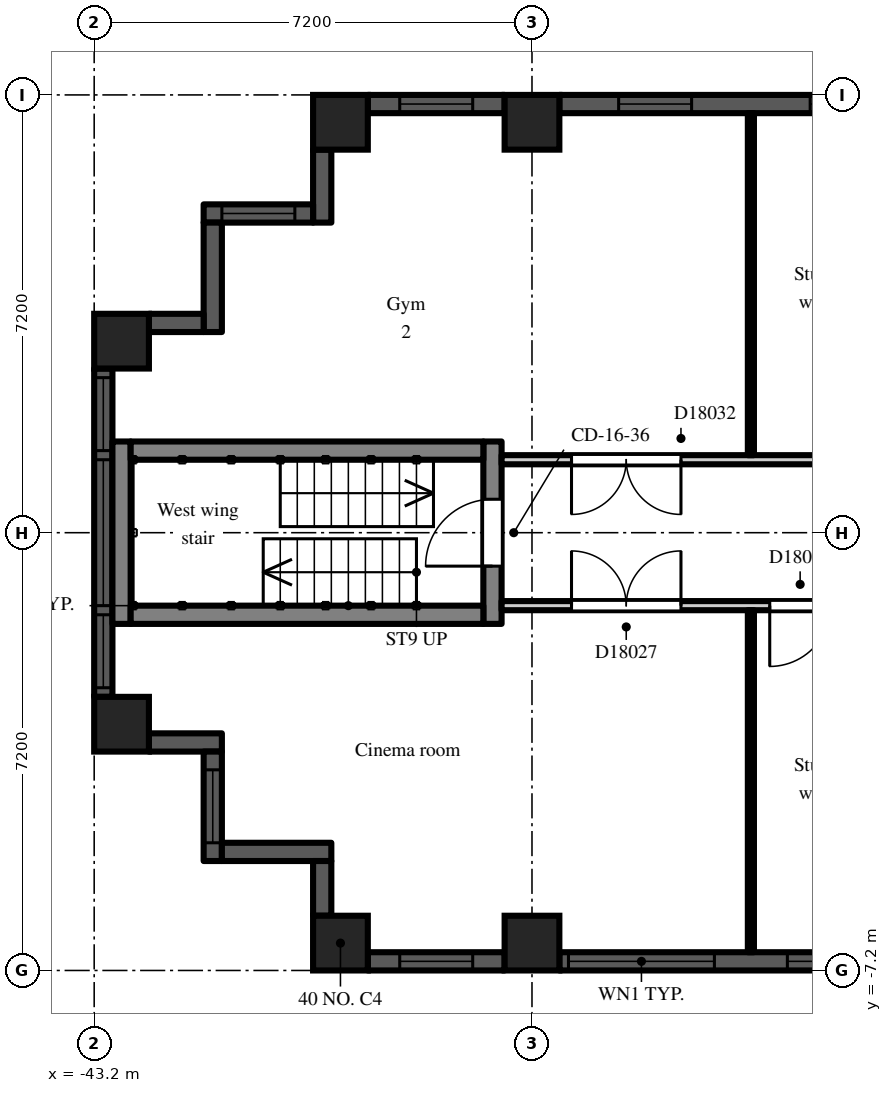
"""IFC4 building model, lengths in metres.
Left out: names, types, materials, properties, quantities, classifications, styles, units other than length and angle.
Written with IfcOpenShell. Run it as: python <this file> out.ifc"""

import sys

from ifc_helpers import new_model, si_unit, direction, frame, frame_2d, origin, origin_2d, place, context, subcontext, project, spatial, rectangle, extrude, element, fill, save


model = new_model("IFC4")
c1 = context("Model", 3, precision=1e-05, world=origin(), true_north=direction((0.0, 1.0)))
c2 = subcontext(c1, "Body", "Model", "MODEL_VIEW")
j1 = project(units=[si_unit("LENGTHUNIT", "METRE"), si_unit("PLANEANGLEUNIT", "RADIAN")], contexts=[c1])
p1 = place(None, origin())
s1 = spatial("IfcSite", under=j1, at=p1, CompositionType="ELEMENT")
p2 = place(p1, origin())
s2 = spatial("IfcBuilding", under=s1, at=p2, CompositionType="ELEMENT")
p3 = place(p2, frame((0.0, 0.0, 123.3)))
s3 = spatial("IfcBuildingStorey", under=s2, at=p3, CompositionType="ELEMENT", Elevation=123.3)
for number, where, z_axis, x_axis in (
    (1, (-42.75, -3.15, 0.0), (0.0, 0.0, 1.0), (1.0, 0.0, 0.0)),
    (2, (-42.75, 3.15, 0.0), (0.0, 0.0, 1.0), (1.0, 0.0, 0.0)),
    (3, (-39.15, -6.75, 0.0), (0.0, 0.0, 1.0), (1.0, 0.0, 0.0)),
    (4, (-39.15, 6.75, 0.0), (0.0, 0.0, 1.0), (1.0, 0.0, 0.0)),
    (5, (-36.0, -6.75, 0.0), (0.0, 0.0, 1.0), (1.0, 0.0, 0.0)),
    (6, (-36.0, 6.75, 0.0), (0.0, 0.0, 1.0), (1.0, 0.0, 0.0)),
):
    element("IfcColumn", number, at=place(p3, frame(where, z_axis=z_axis, x_axis=x_axis)), inside=s3, PredefinedType="COLUMN", context=c2, shape_type="SweptSolid", body=[
        extrude(rectangle(XDim=0.9, YDim=0.9, at=origin_2d()), origin(), (0.0, 0.0, 1.0), 3.0),
    ])
p4 = place(p3, frame((-29.25, 7.05, 0.0), z_axis=(0.0, 0.0, 1.0), x_axis=(-1.0, 0.0, 0.0)))
e7 = element("IfcWall", 7, at=p4, inside=s3, PredefinedType="SOLIDWALL", context=c2, shape_type="SweptSolid", body=[
    extrude(rectangle(XDim=6.3, YDim=0.3, at=frame_2d((3.15, 0.0))), origin(), (0.0, 0.0, 1.0), 2.2),
])
p5 = place(p4, frame((0.975, 0.0, 0.2)))
e8 = element("IfcOpeningElement", 8, at=p5, cuts=e7, PredefinedType="OPENING", context=c2, shape_type="SweptSolid", body=[
    extrude(rectangle(XDim=1.2, YDim=1.85, at=frame_2d((0.6, 0.925))), frame((0.0, 0.16, 0.0), z_axis=(0.0, -1.0, 0.0), x_axis=(1.0, 0.0, 0.0)), (0.0, 0.0, 1.0), 0.32),
])
p6 = place(p4, frame((4.125, 0.0, 0.2)))
e9 = element("IfcOpeningElement", 9, at=p6, cuts=e7, PredefinedType="OPENING", context=c2, shape_type="SweptSolid", body=[
    extrude(rectangle(XDim=1.2, YDim=1.85, at=frame_2d((0.6, 0.925))), frame((0.0, 0.16, 0.0), z_axis=(0.0, -1.0, 0.0), x_axis=(1.0, 0.0, 0.0)), (0.0, 0.0, 1.0), 0.32),
])
p7 = place(p3, frame((-36.45, 7.05, 0.0), z_axis=(0.0, 0.0, 1.0), x_axis=(-1.0, 0.0, 0.0)))
e10 = element("IfcWall", 10, at=p7, inside=s3, PredefinedType="SOLIDWALL", context=c2, shape_type="SweptSolid", body=[
    extrude(rectangle(XDim=2.25, YDim=0.3, at=frame_2d((1.125, 0.0))), origin(), (0.0, 0.0, 1.0), 2.2),
])
p8 = place(p7, frame((0.525, 0.0, 0.2)))
e11 = element("IfcOpeningElement", 11, at=p8, cuts=e10, PredefinedType="OPENING", context=c2, shape_type="SweptSolid", body=[
    extrude(rectangle(XDim=1.2, YDim=1.85, at=frame_2d((0.6, 0.925))), frame((0.0, 0.16, 0.0), z_axis=(0.0, -1.0, 0.0), x_axis=(1.0, 0.0, 0.0)), (0.0, 0.0, 1.0), 0.32),
])
p9 = place(p3, frame((-39.45, 6.3, 0.0), z_axis=(0.0, 0.0, 1.0), x_axis=(0.0, -1.0, 0.0)))
e12 = element("IfcWall", 12, at=p9, inside=s3, PredefinedType="SOLIDWALL", context=c2, shape_type="SweptSolid", body=[
    extrude(rectangle(XDim=1.2, YDim=0.3, at=frame_2d((0.6, 0.0))), origin(), (0.0, 0.0, 1.0), 2.6),
])
p10 = place(p3, frame((-39.6, 5.25, 0.0), z_axis=(0.0, 0.0, 1.0), x_axis=(-1.0, 0.0, 0.0)))
e13 = element("IfcWall", 13, at=p10, inside=s3, PredefinedType="SOLIDWALL", context=c2, shape_type="SweptSolid", body=[
    extrude(rectangle(XDim=1.8, YDim=0.3, at=frame_2d((0.9, 0.0))), origin(), (0.0, 0.0, 1.0), 2.6),
])
p11 = place(p10, frame((0.3, 0.0, 0.2)))
e14 = element("IfcOpeningElement", 14, at=p11, cuts=e13, PredefinedType="OPENING", context=c2, shape_type="SweptSolid", body=[
    extrude(rectangle(XDim=1.2, YDim=1.85, at=frame_2d((0.6, 0.925))), frame((0.0, 0.16, 0.0), z_axis=(0.0, -1.0, 0.0), x_axis=(1.0, 0.0, 0.0)), (0.0, 0.0, 1.0), 0.32),
])
p12 = place(p3, frame((-41.25, 5.1, 0.0), z_axis=(0.0, 0.0, 1.0), x_axis=(0.0, -1.0, 0.0)))
e15 = element("IfcWall", 15, at=p12, inside=s3, PredefinedType="SOLIDWALL", context=c2, shape_type="SweptSolid", body=[
    extrude(rectangle(XDim=1.8, YDim=0.3, at=frame_2d((0.9, 0.0))), origin(), (0.0, 0.0, 1.0), 2.6),
])
p13 = place(p3, frame((-41.4, 3.45, 0.0), z_axis=(0.0, 0.0, 1.0), x_axis=(-1.0, 0.0, 0.0)))
e16 = element("IfcWall", 16, at=p13, inside=s3, PredefinedType="SOLIDWALL", context=c2, shape_type="SweptSolid", body=[
    extrude(rectangle(XDim=0.9, YDim=0.3, at=frame_2d((0.45, 0.0))), origin(), (0.0, 0.0, 1.0), 2.6),
])
p14 = place(p3, frame((-43.05, 2.7, 0.0), z_axis=(0.0, 0.0, 1.0), x_axis=(0.0, -1.0, 0.0)))
e17 = element("IfcWall", 17, at=p14, inside=s3, PredefinedType="SOLIDWALL", context=c2, shape_type="SweptSolid", body=[
    extrude(rectangle(XDim=5.4, YDim=0.3, at=frame_2d((2.7, 0.0))), origin(), (0.0, 0.0, 1.0), 2.2),
])
p15 = place(p14, frame((1.5, 0.0, 0.2)))
e18 = element("IfcOpeningElement", 18, at=p15, cuts=e17, PredefinedType="OPENING", context=c2, shape_type="SweptSolid", body=[
    extrude(rectangle(XDim=2.4, YDim=1.85, at=frame_2d((1.2, 0.925))), frame((0.0, 0.16, 0.0), z_axis=(0.0, -1.0, 0.0), x_axis=(1.0, 0.0, 0.0)), (0.0, 0.0, 1.0), 0.32),
])
p16 = place(p14, frame((0.15, 0.0, 0.2)))
e19 = element("IfcOpeningElement", 19, at=p16, cuts=e17, PredefinedType="OPENING", context=c2, shape_type="SweptSolid", body=[
    extrude(rectangle(XDim=1.2, YDim=1.85, at=frame_2d((0.6, 0.925))), frame((0.0, 0.16, 0.0), z_axis=(0.0, -1.0, 0.0), x_axis=(1.0, 0.0, 0.0)), (0.0, 0.0, 1.0), 0.32),
])
p17 = place(p14, frame((4.05, 0.0, 0.2)))
e20 = element("IfcOpeningElement", 20, at=p17, cuts=e17, PredefinedType="OPENING", context=c2, shape_type="SweptSolid", body=[
    extrude(rectangle(XDim=1.2, YDim=1.85, at=frame_2d((0.6, 0.925))), frame((0.0, 0.16, 0.0), z_axis=(0.0, -1.0, 0.0), x_axis=(1.0, 0.0, 0.0)), (0.0, 0.0, 1.0), 0.32),
])
p18 = place(p3, frame((-42.3, -3.45, 0.0), z_axis=(0.0, 0.0, 1.0), x_axis=(1.0, 0.0, 0.0)))
e21 = element("IfcWall", 21, at=p18, inside=s3, PredefinedType="SOLIDWALL", context=c2, shape_type="SweptSolid", body=[
    extrude(rectangle(XDim=1.2, YDim=0.3, at=frame_2d((0.6, 0.0))), origin(), (0.0, 0.0, 1.0), 2.6),
])
p19 = place(p3, frame((-41.25, -3.6, 0.0), z_axis=(0.0, 0.0, 1.0), x_axis=(0.0, -1.0, 0.0)))
e22 = element("IfcWall", 22, at=p19, inside=s3, PredefinedType="SOLIDWALL", context=c2, shape_type="SweptSolid", body=[
    extrude(rectangle(XDim=1.8, YDim=0.3, at=frame_2d((0.9, 0.0))), origin(), (0.0, 0.0, 1.0), 2.6),
])
p20 = place(p19, frame((0.3, 0.0, 0.2)))
e23 = element("IfcOpeningElement", 23, at=p20, cuts=e22, PredefinedType="OPENING", context=c2, shape_type="SweptSolid", body=[
    extrude(rectangle(XDim=1.2, YDim=1.85, at=frame_2d((0.6, 0.925))), frame((0.0, 0.16, 0.0), z_axis=(0.0, -1.0, 0.0), x_axis=(1.0, 0.0, 0.0)), (0.0, 0.0, 1.0), 0.32),
])
p21 = place(p3, frame((-41.1, -5.25, 0.0), z_axis=(0.0, 0.0, 1.0), x_axis=(1.0, 0.0, 0.0)))
e24 = element("IfcWall", 24, at=p21, inside=s3, PredefinedType="SOLIDWALL", context=c2, shape_type="SweptSolid", body=[
    extrude(rectangle(XDim=1.8, YDim=0.3, at=frame_2d((0.9, 0.0))), origin(), (0.0, 0.0, 1.0), 2.6),
])
p22 = place(p3, frame((-39.45, -5.4, 0.0), z_axis=(0.0, 0.0, 1.0), x_axis=(0.0, -1.0, 0.0)))
e25 = element("IfcWall", 25, at=p22, inside=s3, PredefinedType="SOLIDWALL", context=c2, shape_type="SweptSolid", body=[
    extrude(rectangle(XDim=0.9, YDim=0.3, at=frame_2d((0.45, 0.0))), origin(), (0.0, 0.0, 1.0), 2.6),
])
p23 = place(p3, frame((-38.7, -7.05, 0.0), z_axis=(0.0, 0.0, 1.0), x_axis=(1.0, 0.0, 0.0)))
e26 = element("IfcWall", 26, at=p23, inside=s3, PredefinedType="SOLIDWALL", context=c2, shape_type="SweptSolid", body=[
    extrude(rectangle(XDim=2.25, YDim=0.3, at=frame_2d((1.125, 0.0))), origin(), (0.0, 0.0, 1.0), 2.2),
])
p24 = place(p23, frame((0.525, 0.0, 0.2)))
e27 = element("IfcOpeningElement", 27, at=p24, cuts=e26, PredefinedType="OPENING", context=c2, shape_type="SweptSolid", body=[
    extrude(rectangle(XDim=1.2, YDim=1.85, at=frame_2d((0.6, 0.925))), frame((0.0, 0.16, 0.0), z_axis=(0.0, -1.0, 0.0), x_axis=(1.0, 0.0, 0.0)), (0.0, 0.0, 1.0), 0.32),
])
p25 = place(p3, frame((-35.55, -7.05, 0.0), z_axis=(0.0, 0.0, 1.0), x_axis=(1.0, 0.0, 0.0)))
e28 = element("IfcWall", 28, at=p25, inside=s3, PredefinedType="SOLIDWALL", context=c2, shape_type="SweptSolid", body=[
    extrude(rectangle(XDim=6.3, YDim=0.3, at=frame_2d((3.15, 0.0))), origin(), (0.0, 0.0, 1.0), 2.2),
])
p26 = place(p25, frame((0.15, 0.0, 0.2)))
e29 = element("IfcOpeningElement", 29, at=p26, cuts=e28, PredefinedType="OPENING", context=c2, shape_type="SweptSolid", body=[
    extrude(rectangle(XDim=2.4, YDim=1.85, at=frame_2d((1.2, 0.925))), frame((0.0, 0.16, 0.0), z_axis=(0.0, -1.0, 0.0), x_axis=(1.0, 0.0, 0.0)), (0.0, 0.0, 1.0), 0.32),
])
p27 = place(p25, frame((3.75, 0.0, 0.2)))
e30 = element("IfcOpeningElement", 30, at=p27, cuts=e28, PredefinedType="OPENING", context=c2, shape_type="SweptSolid", body=[
    extrude(rectangle(XDim=2.4, YDim=1.85, at=frame_2d((1.2, 0.925))), frame((0.0, 0.16, 0.0), z_axis=(0.0, -1.0, 0.0), x_axis=(1.0, 0.0, 0.0)), (0.0, 0.0, 1.0), 0.32),
])
p28 = place(p3, frame((-36.65, -1.5, 0.0), z_axis=(0.0, 0.0, 1.0), x_axis=(0.0, 1.0, 0.0)))
e31 = element("IfcWall", 31, at=p28, inside=s3, PredefinedType="SHEAR", context=c2, shape_type="SweptSolid", body=[
    extrude(rectangle(XDim=3.0, YDim=0.3, at=frame_2d((1.5, 0.0))), origin(), (0.0, 0.0, 1.0), 2.6),
])
p29 = place(p28, frame((0.95, 0.0, 0.0)))
e32 = element("IfcOpeningElement", 32, at=p29, cuts=e31, PredefinedType="OPENING", context=c2, shape_type="SweptSolid", body=[
    extrude(rectangle(XDim=1.1, YDim=2.1, at=frame_2d((0.55, 1.05))), frame((0.0, 0.16, 0.0), z_axis=(0.0, -1.0, 0.0), x_axis=(1.0, 0.0, 0.0)), (0.0, 0.0, 1.0), 0.32),
])
p30 = place(p3, frame((-42.75, -1.5, 0.0), z_axis=(0.0, 0.0, 1.0), x_axis=(0.0, 1.0, 0.0)))
e33 = element("IfcWall", 33, at=p30, inside=s3, PredefinedType="SHEAR", context=c2, shape_type="SweptSolid", body=[
    extrude(rectangle(XDim=3.0, YDim=0.3, at=frame_2d((1.5, 0.0))), origin(), (0.0, 0.0, 1.0), 2.6),
])
for number, where, z_axis, x_axis in (
    (34, (-36.8, -1.35, 0.0), (0.0, 0.0, 1.0), (-1.0, 0.0, 0.0)),
    (35, (-36.8, 1.35, 0.0), (0.0, 0.0, 1.0), (-1.0, 0.0, 0.0)),
):
    element("IfcWall", number, at=place(p3, frame(where, z_axis=z_axis, x_axis=x_axis)), inside=s3, PredefinedType="SHEAR", context=c2, shape_type="SweptSolid", body=[
        extrude(rectangle(XDim=5.8, YDim=0.3, at=frame_2d((2.9, 0.0))), origin(), (0.0, 0.0, 1.0), 2.6),
    ])
p31 = place(p3, frame((-36.5, -1.2, 0.0), z_axis=(0.0, 0.0, 1.0), x_axis=(1.0, 0.0, 0.0)))
e36 = element("IfcWall", 36, at=p31, inside=s3, PredefinedType="PARTITIONING", context=c2, shape_type="SweptSolid", body=[
    extrude(rectangle(XDim=14.9, YDim=0.15, at=frame_2d((7.45, 0.0))), origin(), (0.0, 0.0, 1.0), 2.6),
])
p32 = place(p31, frame((13.3, 0.0, 0.0)))
e37 = element("IfcOpeningElement", 37, at=p32, cuts=e36, PredefinedType="OPENING", context=c2, shape_type="SweptSolid", body=[
    extrude(rectangle(XDim=1.0, YDim=2.1, at=frame_2d((0.5, 1.05))), frame((0.0, 0.085, 0.0), z_axis=(0.0, -1.0, 0.0), x_axis=(1.0, 0.0, 0.0)), (0.0, 0.0, 1.0), 0.17),
])
p33 = place(p31, frame((4.41, 0.0, 0.0)))
e38 = element("IfcOpeningElement", 38, at=p33, cuts=e36, PredefinedType="OPENING", context=c2, shape_type="SweptSolid", body=[
    extrude(rectangle(XDim=1.0, YDim=2.1, at=frame_2d((0.5, 1.05))), frame((0.0, 0.085, 0.0), z_axis=(0.0, -1.0, 0.0), x_axis=(1.0, 0.0, 0.0)), (0.0, 0.0, 1.0), 0.17),
])
p34 = place(p31, frame((1.15, 0.0, 0.0)))
e39 = element("IfcOpeningElement", 39, at=p34, cuts=e36, PredefinedType="OPENING", context=c2, shape_type="SweptSolid", body=[
    extrude(rectangle(XDim=1.8, YDim=2.1, at=frame_2d((0.9, 1.05))), frame((0.0, 0.085, 0.0), z_axis=(0.0, -1.0, 0.0), x_axis=(1.0, 0.0, 0.0)), (0.0, 0.0, 1.0), 0.17),
])
p35 = place(p3, frame((-36.5, 1.2, 0.0), z_axis=(0.0, 0.0, 1.0), x_axis=(1.0, 0.0, 0.0)))
e40 = element("IfcWall", 40, at=p35, inside=s3, PredefinedType="PARTITIONING", context=c2, shape_type="SweptSolid", body=[
    extrude(rectangle(XDim=14.9, YDim=0.15, at=frame_2d((7.45, 0.0))), origin(), (0.0, 0.0, 1.0), 2.6),
])
p36 = place(p35, frame((13.7, 0.0, 0.0)))
e41 = element("IfcOpeningElement", 41, at=p36, cuts=e40, PredefinedType="OPENING", context=c2, shape_type="SweptSolid", body=[
    extrude(rectangle(XDim=1.0, YDim=2.1, at=frame_2d((0.5, 1.05))), frame((0.0, 0.085, 0.0), z_axis=(0.0, -1.0, 0.0), x_axis=(1.0, 0.0, 0.0)), (0.0, 0.0, 1.0), 0.17),
])
p37 = place(p35, frame((8.19, 0.0, 0.0)))
e42 = element("IfcOpeningElement", 42, at=p37, cuts=e40, PredefinedType="OPENING", context=c2, shape_type="SweptSolid", body=[
    extrude(rectangle(XDim=1.0, YDim=2.1, at=frame_2d((0.5, 1.05))), frame((0.0, 0.085, 0.0), z_axis=(0.0, -1.0, 0.0), x_axis=(1.0, 0.0, 0.0)), (0.0, 0.0, 1.0), 0.17),
])
p38 = place(p35, frame((1.15, 0.0, 0.0)))
e43 = element("IfcOpeningElement", 43, at=p38, cuts=e40, PredefinedType="OPENING", context=c2, shape_type="SweptSolid", body=[
    extrude(rectangle(XDim=1.8, YDim=2.1, at=frame_2d((0.9, 1.05))), frame((0.0, 0.085, 0.0), z_axis=(0.0, -1.0, 0.0), x_axis=(1.0, 0.0, 0.0)), (0.0, 0.0, 1.0), 0.17),
])
for number, where, z_axis, x_axis in (
    (44, (-32.4, -6.9, 0.0), (0.0, 0.0, 1.0), (0.0, 1.0, 0.0)),
    (45, (-32.4, 1.275, 0.0), (0.0, 0.0, 1.0), (0.0, 1.0, 0.0)),
):
    element("IfcWall", number, at=place(p3, frame(where, z_axis=z_axis, x_axis=x_axis)), inside=s3, PredefinedType="PARTITIONING", context=c2, shape_type="SweptSolid", body=[
        extrude(rectangle(XDim=5.625, YDim=0.1, at=frame_2d((2.812, 0.0))), origin(), (0.0, 0.0, 1.0), 2.6),
    ])
p39 = place(p5, origin())
e46 = element("IfcWindow", 46, at=p39, inside=s3, PartitioningType="SINGLE_PANEL", PredefinedType="WINDOW", context=c2, shape_type="SweptSolid", body=[
    extrude(rectangle(XDim=1.2, YDim=1.85, at=frame_2d((0.6, 0.925))), frame((0.0, 0.03, 0.0), z_axis=(0.0, -1.0, 0.0), x_axis=(1.0, 0.0, 0.0)), (0.0, 0.0, 1.0), 0.06),
])
fill(e8, e46)
p40 = place(p6, origin())
e47 = element("IfcWindow", 47, at=p40, inside=s3, PartitioningType="SINGLE_PANEL", PredefinedType="WINDOW", context=c2, shape_type="SweptSolid", body=[
    extrude(rectangle(XDim=1.2, YDim=1.85, at=frame_2d((0.6, 0.925))), frame((0.0, 0.03, 0.0), z_axis=(0.0, -1.0, 0.0), x_axis=(1.0, 0.0, 0.0)), (0.0, 0.0, 1.0), 0.06),
])
fill(e9, e47)
p41 = place(p8, origin())
e48 = element("IfcWindow", 48, at=p41, inside=s3, PartitioningType="SINGLE_PANEL", PredefinedType="WINDOW", context=c2, shape_type="SweptSolid", body=[
    extrude(rectangle(XDim=1.2, YDim=1.85, at=frame_2d((0.6, 0.925))), frame((0.0, 0.03, 0.0), z_axis=(0.0, -1.0, 0.0), x_axis=(1.0, 0.0, 0.0)), (0.0, 0.0, 1.0), 0.06),
])
fill(e11, e48)
p42 = place(p11, origin())
e49 = element("IfcWindow", 49, at=p42, inside=s3, PartitioningType="SINGLE_PANEL", PredefinedType="WINDOW", context=c2, shape_type="SweptSolid", body=[
    extrude(rectangle(XDim=1.2, YDim=1.85, at=frame_2d((0.6, 0.925))), frame((0.0, 0.03, 0.0), z_axis=(0.0, -1.0, 0.0), x_axis=(1.0, 0.0, 0.0)), (0.0, 0.0, 1.0), 0.06),
])
fill(e14, e49)
p43 = place(p15, origin())
e50 = element("IfcWindow", 50, at=p43, inside=s3, PartitioningType="SINGLE_PANEL", PredefinedType="WINDOW", context=c2, shape_type="SweptSolid", body=[
    extrude(rectangle(XDim=2.4, YDim=1.85, at=frame_2d((1.2, 0.925))), frame((0.0, 0.03, 0.0), z_axis=(0.0, -1.0, 0.0), x_axis=(1.0, 0.0, 0.0)), (0.0, 0.0, 1.0), 0.06),
])
fill(e18, e50)
p44 = place(p16, origin())
e51 = element("IfcWindow", 51, at=p44, inside=s3, PartitioningType="SINGLE_PANEL", PredefinedType="WINDOW", context=c2, shape_type="SweptSolid", body=[
    extrude(rectangle(XDim=1.2, YDim=1.85, at=frame_2d((0.6, 0.925))), frame((0.0, 0.03, 0.0), z_axis=(0.0, -1.0, 0.0), x_axis=(1.0, 0.0, 0.0)), (0.0, 0.0, 1.0), 0.06),
])
fill(e19, e51)
p45 = place(p17, origin())
e52 = element("IfcWindow", 52, at=p45, inside=s3, PartitioningType="SINGLE_PANEL", PredefinedType="WINDOW", context=c2, shape_type="SweptSolid", body=[
    extrude(rectangle(XDim=1.2, YDim=1.85, at=frame_2d((0.6, 0.925))), frame((0.0, 0.03, 0.0), z_axis=(0.0, -1.0, 0.0), x_axis=(1.0, 0.0, 0.0)), (0.0, 0.0, 1.0), 0.06),
])
fill(e20, e52)
p46 = place(p20, origin())
e53 = element("IfcWindow", 53, at=p46, inside=s3, PartitioningType="SINGLE_PANEL", PredefinedType="WINDOW", context=c2, shape_type="SweptSolid", body=[
    extrude(rectangle(XDim=1.2, YDim=1.85, at=frame_2d((0.6, 0.925))), frame((0.0, 0.03, 0.0), z_axis=(0.0, -1.0, 0.0), x_axis=(1.0, 0.0, 0.0)), (0.0, 0.0, 1.0), 0.06),
])
fill(e23, e53)
p47 = place(p24, origin())
e54 = element("IfcWindow", 54, at=p47, inside=s3, PartitioningType="SINGLE_PANEL", PredefinedType="WINDOW", context=c2, shape_type="SweptSolid", body=[
    extrude(rectangle(XDim=1.2, YDim=1.85, at=frame_2d((0.6, 0.925))), frame((0.0, 0.03, 0.0), z_axis=(0.0, -1.0, 0.0), x_axis=(1.0, 0.0, 0.0)), (0.0, 0.0, 1.0), 0.06),
])
fill(e27, e54)
p48 = place(p26, origin())
e55 = element("IfcWindow", 55, at=p48, inside=s3, PartitioningType="SINGLE_PANEL", PredefinedType="WINDOW", context=c2, shape_type="SweptSolid", body=[
    extrude(rectangle(XDim=2.4, YDim=1.85, at=frame_2d((1.2, 0.925))), frame((0.0, 0.03, 0.0), z_axis=(0.0, -1.0, 0.0), x_axis=(1.0, 0.0, 0.0)), (0.0, 0.0, 1.0), 0.06),
])
fill(e29, e55)
p49 = place(p27, origin())
e56 = element("IfcWindow", 56, at=p49, inside=s3, PartitioningType="SINGLE_PANEL", PredefinedType="WINDOW", context=c2, shape_type="SweptSolid", body=[
    extrude(rectangle(XDim=2.4, YDim=1.85, at=frame_2d((1.2, 0.925))), frame((0.0, 0.03, 0.0), z_axis=(0.0, -1.0, 0.0), x_axis=(1.0, 0.0, 0.0)), (0.0, 0.0, 1.0), 0.06),
])
fill(e30, e56)
p50 = place(p29, origin())
e57 = element("IfcDoor", 57, at=p50, inside=s3, OperationType="SINGLE_SWING_LEFT", PredefinedType="DOOR", context=c2, shape_type="SweptSolid", body=[
    extrude(rectangle(XDim=1.1, YDim=2.1, at=frame_2d((0.55, 1.05))), frame((0.0, 0.025, 0.0), z_axis=(0.0, -1.0, 0.0), x_axis=(1.0, 0.0, 0.0)), (0.0, 0.0, 1.0), 0.05),
])
fill(e32, e57)
p51 = place(p33, frame((1.0, 0.0, 0.0), z_axis=(0.0, 0.0, 1.0), x_axis=(-1.0, 0.0, 0.0)))
e58 = element("IfcDoor", 58, at=p51, inside=s3, OperationType="SINGLE_SWING_RIGHT", PredefinedType="DOOR", context=c2, shape_type="SweptSolid", body=[
    extrude(rectangle(XDim=1.0, YDim=2.1, at=frame_2d((0.5, 1.05))), frame((0.0, 0.025, 0.0), z_axis=(0.0, -1.0, 0.0), x_axis=(1.0, 0.0, 0.0)), (0.0, 0.0, 1.0), 0.05),
])
fill(e38, e58)
p52 = place(p34, origin())
e59 = element("IfcDoor", 59, at=p52, inside=s3, OperationType="DOUBLE_DOOR_DOUBLE_SWING", PredefinedType="DOOR", context=c2, shape_type="SweptSolid", body=[
    extrude(rectangle(XDim=1.8, YDim=2.1, at=frame_2d((0.9, 1.05))), frame((0.0, 0.025, 0.0), z_axis=(0.0, -1.0, 0.0), x_axis=(1.0, 0.0, 0.0)), (0.0, 0.0, 1.0), 0.05),
])
fill(e39, e59)
p53 = place(p38, frame((1.8, 0.0, 0.0), z_axis=(0.0, 0.0, 1.0), x_axis=(-1.0, 0.0, 0.0)))
e60 = element("IfcDoor", 60, at=p53, inside=s3, OperationType="DOUBLE_DOOR_DOUBLE_SWING", PredefinedType="DOOR", context=c2, shape_type="SweptSolid", body=[
    extrude(rectangle(XDim=1.8, YDim=2.1, at=frame_2d((0.9, 1.05))), frame((0.0, 0.025, 0.0), z_axis=(0.0, -1.0, 0.0), x_axis=(1.0, 0.0, 0.0)), (0.0, 0.0, 1.0), 0.05),
])
fill(e43, e60)
save(model, sys.argv[1])
